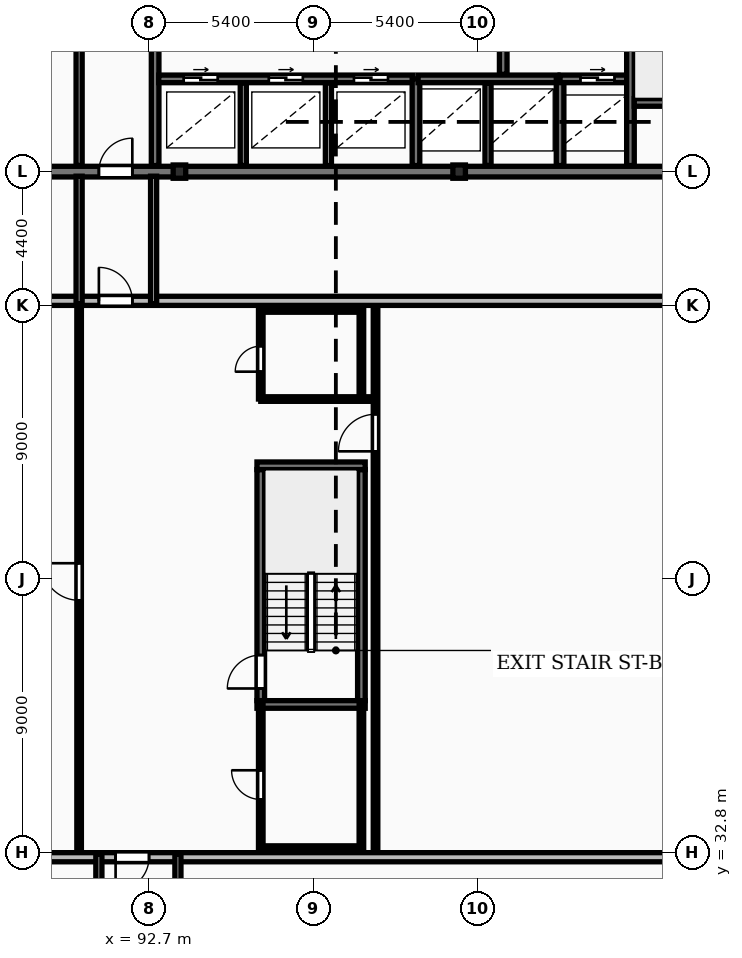
"""IFC4 building model, lengths in metres.
Left out: names, types, materials, properties, quantities, classifications, styles, units other than length and angle.
Written with IfcOpenShell. Run it as: python <this file> out.ifc"""

import sys

from ifc_helpers import new_model, si_unit, direction, frame, frame_2d, origin, origin_2d, place, context, subcontext, project, spatial, rectangle, i_section, extrude, element, fill, save


model = new_model("IFC4")
c1 = context("Model", 3, precision=1e-05, world=origin(), true_north=direction((0.0, 1.0)))
c2 = subcontext(c1, "Body", "Model", "MODEL_VIEW")
j1 = project(units=[si_unit("LENGTHUNIT", "METRE"), si_unit("PLANEANGLEUNIT", "RADIAN")], contexts=[c1])
p1 = place(None, origin())
s1 = spatial("IfcSite", under=j1, at=p1, CompositionType="ELEMENT")
p2 = place(p1, origin())
s2 = spatial("IfcBuilding", under=s1, at=p2, CompositionType="ELEMENT")
p3 = place(p2, frame((0.0, 0.0, 150.1)))
s3 = spatial("IfcBuildingStorey", under=s2, at=p3, CompositionType="ELEMENT", Elevation=150.1)
for number, where, z_axis, x_axis in (
    (1, (93.7, 55.2, 0.0), (0.0, 0.0, 1.0), (1.0, 0.0, 0.0)),
    (2, (102.9, 55.2, 0.0), (0.0, 0.0, 1.0), (1.0, 0.0, 0.0)),
):
    element("IfcColumn", number, at=place(p3, frame(where, z_axis=z_axis, x_axis=x_axis)), inside=s3, PredefinedType="COLUMN", context=c2, shape_type="SweptSolid", body=[
        extrude(i_section(OverallWidth=0.412, OverallDepth=0.437, WebThickness=0.036, FlangeThickness=0.052, FilletRadius=0.015, at=origin_2d()), origin(), (0.0, 0.0, 1.0), 3.6),
    ])
p4 = place(p3, frame((57.6, 50.95, 0.0), z_axis=(0.0, 0.0, 1.0), x_axis=(1.0, 0.0, 0.0)))
e3 = element("IfcWall", 3, at=p4, inside=s3, PredefinedType="STANDARD", context=c2, shape_type="SweptSolid", body=[
    extrude(rectangle(XDim=73.0, YDim=0.3, at=frame_2d((36.5, 0.0))), origin(), (0.0, 0.0, 1.0), 3.31),
])
p5 = place(p4, frame((15.225, 0.0, 0.85)))
e4 = element("IfcOpeningElement", 4, at=p5, cuts=e3, PredefinedType="OPENING", context=c2, shape_type="SweptSolid", body=[
    extrude(rectangle(XDim=1.8, YDim=1.8, at=frame_2d((0.9, 0.9))), frame((0.0, 0.16, 0.0), z_axis=(0.0, -1.0, 0.0), x_axis=(1.0, 0.0, 0.0)), (0.0, 0.0, 1.0), 0.32),
])
p6 = place(p4, frame((58.575, 0.0, 0.85)))
e5 = element("IfcOpeningElement", 5, at=p6, cuts=e3, PredefinedType="OPENING", context=c2, shape_type="SweptSolid", body=[
    extrude(rectangle(XDim=1.8, YDim=1.8, at=frame_2d((0.9, 0.9))), frame((0.0, 0.16, 0.0), z_axis=(0.0, -1.0, 0.0), x_axis=(1.0, 0.0, 0.0)), (0.0, 0.0, 1.0), 0.32),
])
p7 = place(p4, frame((33.45, 0.0, 0.0)))
e6 = element("IfcOpeningElement", 6, at=p7, cuts=e3, PredefinedType="OPENING", context=c2, shape_type="SweptSolid", body=[
    extrude(rectangle(XDim=1.1, YDim=2.1, at=frame_2d((0.55, 1.05))), frame((0.0, 0.16, 0.0), z_axis=(0.0, -1.0, 0.0), x_axis=(1.0, 0.0, 0.0)), (0.0, 0.0, 1.0), 0.32),
])
p8 = place(p3, frame((130.7, 32.65, 0.0), z_axis=(0.0, 0.0, 1.0), x_axis=(-1.0, 0.0, 0.0)))
e7 = element("IfcWall", 7, at=p8, inside=s3, PredefinedType="STANDARD", context=c2, shape_type="SweptSolid", body=[
    extrude(rectangle(XDim=58.0, YDim=0.3, at=frame_2d((29.0, 0.0))), origin(), (0.0, 0.0, 1.0), 3.31),
])
p9 = place(p8, frame((50.125, 0.0, 0.85)))
e8 = element("IfcOpeningElement", 8, at=p9, cuts=e7, PredefinedType="OPENING", context=c2, shape_type="SweptSolid", body=[
    extrude(rectangle(XDim=1.8, YDim=1.8, at=frame_2d((0.9, 0.9))), frame((0.0, 0.16, 0.0), z_axis=(0.0, -1.0, 0.0), x_axis=(1.0, 0.0, 0.0)), (0.0, 0.0, 1.0), 0.32),
])
p10 = place(p8, frame((6.775, 0.0, 0.85)))
e9 = element("IfcOpeningElement", 9, at=p10, cuts=e7, PredefinedType="OPENING", context=c2, shape_type="SweptSolid", body=[
    extrude(rectangle(XDim=1.8, YDim=1.8, at=frame_2d((0.9, 0.9))), frame((0.0, 0.16, 0.0), z_axis=(0.0, -1.0, 0.0), x_axis=(1.0, 0.0, 0.0)), (0.0, 0.0, 1.0), 0.32),
])
p11 = place(p8, frame((38.0, 0.0, 0.0)))
e10 = element("IfcOpeningElement", 10, at=p11, cuts=e7, PredefinedType="OPENING", context=c2, shape_type="SweptSolid", body=[
    extrude(rectangle(XDim=1.1, YDim=2.1, at=frame_2d((0.55, 1.05))), frame((0.0, 0.16, 0.0), z_axis=(0.0, -1.0, 0.0), x_axis=(1.0, 0.0, 0.0)), (0.0, 0.0, 1.0), 0.32),
])
p12 = place(p3, frame((75.95, 55.2, 0.0), z_axis=(0.0, 0.0, 1.0), x_axis=(1.0, 0.0, 0.0)))
e11 = element("IfcWall", 11, at=p12, inside=s3, PredefinedType="SHEAR", context=c2, shape_type="SweptSolid", body=[
    extrude(rectangle(XDim=36.3, YDim=0.35, at=frame_2d((18.15, 0.0))), origin(), (0.0, 0.0, 1.0), 3.6),
])
p13 = place(p12, frame((15.1, 0.0, 0.0)))
e12 = element("IfcOpeningElement", 12, at=p13, cuts=e11, PredefinedType="OPENING", context=c2, shape_type="SweptSolid", body=[
    extrude(rectangle(XDim=1.1, YDim=2.1, at=frame_2d((0.55, 1.05))), frame((0.0, 0.185, 0.0), z_axis=(0.0, -1.0, 0.0), x_axis=(1.0, 0.0, 0.0)), (0.0, 0.0, 1.0), 0.37),
])
p14 = place(p3, frame((90.4, 55.4, 0.0), z_axis=(0.0, 0.0, 1.0), x_axis=(0.0, 1.0, 0.0)))
e13 = element("IfcWall", 13, at=p14, inside=s3, PredefinedType="PARTITIONING", context=c2, shape_type="SweptSolid", body=[
    extrude(rectangle(XDim=4.1, YDim=0.2, at=frame_2d((2.05, 0.0))), origin(), (0.0, 0.0, 1.0), 3.31),
])
p15 = place(p3, frame((92.9, 55.4, 0.0), z_axis=(0.0, 0.0, 1.0), x_axis=(0.0, 1.0, 0.0)))
e14 = element("IfcWall", 14, at=p15, inside=s3, PredefinedType="SHEAR", context=c2, shape_type="SweptSolid", body=[
    extrude(rectangle(XDim=4.1, YDim=0.25, at=frame_2d((2.05, 0.0))), origin(), (0.0, 0.0, 1.0), 3.6),
])
for number, where, z_axis, x_axis in (
    (15, (95.8, 55.4, 0.0), (0.0, 0.0, 1.0), (0.0, 1.0, 0.0)),
    (16, (98.6, 55.4, 0.0), (0.0, 0.0, 1.0), (0.0, 1.0, 0.0)),
):
    element("IfcWall", number, at=place(p3, frame(where, z_axis=z_axis, x_axis=x_axis)), inside=s3, PredefinedType="PARTITIONING", context=c2, shape_type="SweptSolid", body=[
        extrude(rectangle(XDim=2.72, YDim=0.2, at=frame_2d((1.36, 0.0))), origin(), (0.0, 0.0, 1.0), 3.31),
    ])
p16 = place(p3, frame((93.02, 58.25, 0.0), z_axis=(0.0, 0.0, 1.0), x_axis=(1.0, 0.0, 0.0)))
e17 = element("IfcWall", 17, at=p16, inside=s3, PredefinedType="SHEAR", context=c2, shape_type="SweptSolid", body=[
    extrude(rectangle(XDim=8.36, YDim=0.25, at=frame_2d((4.18, 0.0))), origin(), (0.0, 0.0, 1.0), 3.6),
])
p17 = place(p16, frame((0.82, 0.0, 0.0)))
e18 = element("IfcOpeningElement", 18, at=p17, cuts=e17, PredefinedType="OPENING", context=c2, shape_type="SweptSolid", body=[
    extrude(rectangle(XDim=1.12, YDim=2.12, at=frame_2d((0.56, 1.06))), frame((0.0, 0.135, 0.0), z_axis=(0.0, -1.0, 0.0), x_axis=(1.0, 0.0, 0.0)), (0.0, 0.0, 1.0), 0.27),
])
p18 = place(p16, frame((3.62, 0.0, 0.0)))
e19 = element("IfcOpeningElement", 19, at=p18, cuts=e17, PredefinedType="OPENING", context=c2, shape_type="SweptSolid", body=[
    extrude(rectangle(XDim=1.12, YDim=2.12, at=frame_2d((0.56, 1.06))), frame((0.0, 0.135, 0.0), z_axis=(0.0, -1.0, 0.0), x_axis=(1.0, 0.0, 0.0)), (0.0, 0.0, 1.0), 0.27),
])
p19 = place(p16, frame((6.42, 0.0, 0.0)))
e20 = element("IfcOpeningElement", 20, at=p19, cuts=e17, PredefinedType="OPENING", context=c2, shape_type="SweptSolid", body=[
    extrude(rectangle(XDim=1.12, YDim=2.12, at=frame_2d((0.56, 1.06))), frame((0.0, 0.135, 0.0), z_axis=(0.0, -1.0, 0.0), x_axis=(1.0, 0.0, 0.0)), (0.0, 0.0, 1.0), 0.27),
])
p20 = place(p3, frame((101.48, 55.4, 0.0), z_axis=(0.0, 0.0, 1.0), x_axis=(0.0, 1.0, 0.0)))
e21 = element("IfcWall", 21, at=p20, inside=s3, PredefinedType="SHEAR", context=c2, shape_type="SweptSolid", body=[
    extrude(rectangle(XDim=2.85, YDim=0.25, at=frame_2d((1.425, 0.0))), origin(), (0.0, 0.0, 1.0), 3.6),
])
p21 = place(p3, frame((103.85, 55.4, 0.0), z_axis=(0.0, 0.0, 1.0), x_axis=(0.0, 1.0, 0.0)))
e22 = element("IfcWall", 22, at=p21, inside=s3, PredefinedType="PARTITIONING", context=c2, shape_type="SweptSolid", body=[
    extrude(rectangle(XDim=2.72, YDim=0.2, at=frame_2d((1.36, 0.0))), origin(), (0.0, 0.0, 1.0), 3.31),
])
p22 = place(p3, frame((101.55, 58.25, 0.0), z_axis=(0.0, 0.0, 1.0), x_axis=(1.0, 0.0, 0.0)))
e23 = element("IfcWall", 23, at=p22, inside=s3, PredefinedType="SHEAR", context=c2, shape_type="SweptSolid", body=[
    extrude(rectangle(XDim=4.6, YDim=0.25, at=frame_2d((2.3, 0.0))), origin(), (0.0, 0.0, 1.0), 3.6),
])
p23 = place(p3, frame((106.22, 55.4, 0.0), z_axis=(0.0, 0.0, 1.0), x_axis=(0.0, 1.0, 0.0)))
e24 = element("IfcWall", 24, at=p23, inside=s3, PredefinedType="SHEAR", context=c2, shape_type="SweptSolid", body=[
    extrude(rectangle(XDim=2.85, YDim=0.25, at=frame_2d((1.425, 0.0))), origin(), (0.0, 0.0, 1.0), 3.6),
])
p24 = place(p3, frame((106.22, 58.25, 0.0), z_axis=(0.0, 0.0, 1.0), x_axis=(1.0, 0.0, 0.0)))
e25 = element("IfcWall", 25, at=p24, inside=s3, PredefinedType="SHEAR", context=c2, shape_type="SweptSolid", body=[
    extrude(rectangle(XDim=2.46, YDim=0.25, at=frame_2d((1.23, 0.0))), origin(), (0.0, 0.0, 1.0), 3.6),
])
p25 = place(p24, frame((0.67, 0.0, 0.0)))
e26 = element("IfcOpeningElement", 26, at=p25, cuts=e25, PredefinedType="OPENING", context=c2, shape_type="SweptSolid", body=[
    extrude(rectangle(XDim=1.12, YDim=2.12, at=frame_2d((0.56, 1.06))), frame((0.0, 0.135, 0.0), z_axis=(0.0, -1.0, 0.0), x_axis=(1.0, 0.0, 0.0)), (0.0, 0.0, 1.0), 0.27),
])
p26 = place(p3, frame((104.35, 58.4, 0.0), z_axis=(0.0, 0.0, 1.0), x_axis=(0.0, 1.0, 0.0)))
e27 = element("IfcWall", 27, at=p26, inside=s3, PredefinedType="SHEAR", context=c2, shape_type="SweptSolid", body=[
    extrude(rectangle(XDim=8.6, YDim=0.25, at=frame_2d((4.3, 0.0))), origin(), (0.0, 0.0, 1.0), 3.6),
])
p27 = place(p26, frame((1.8, 0.0, 0.0)))
e28 = element("IfcOpeningElement", 28, at=p27, cuts=e27, PredefinedType="OPENING", context=c2, shape_type="SweptSolid", body=[
    extrude(rectangle(XDim=1.1, YDim=2.1, at=frame_2d((0.55, 1.05))), frame((0.0, 0.135, 0.0), z_axis=(0.0, -1.0, 0.0), x_axis=(1.0, 0.0, 0.0)), (0.0, 0.0, 1.0), 0.27),
])
p28 = place(p3, frame((108.535, 55.4, 0.0), z_axis=(0.0, 0.0, 1.0), x_axis=(0.0, 1.0, 0.0)))
e29 = element("IfcWall", 29, at=p28, inside=s3, PredefinedType="SHEAR", context=c2, shape_type="SweptSolid", body=[
    extrude(rectangle(XDim=11.6, YDim=0.25, at=frame_2d((5.8, 0.0))), origin(), (0.0, 0.0, 1.0), 3.6),
])
p29 = place(p28, frame((8.2, 0.0, 0.0)))
e30 = element("IfcOpeningElement", 30, at=p29, cuts=e29, PredefinedType="OPENING", context=c2, shape_type="SweptSolid", body=[
    extrude(rectangle(XDim=1.1, YDim=2.1, at=frame_2d((0.55, 1.05))), frame((0.0, 0.135, 0.0), z_axis=(0.0, -1.0, 0.0), x_axis=(1.0, 0.0, 0.0)), (0.0, 0.0, 1.0), 0.27),
])
p30 = place(p28, frame((10.25, 0.0, 0.0)))
e31 = element("IfcOpeningElement", 31, at=p30, cuts=e29, PredefinedType="OPENING", context=c2, shape_type="SweptSolid", body=[
    extrude(rectangle(XDim=0.85, YDim=2.05, at=frame_2d((0.425, 1.025))), frame((0.0, 0.135, 0.0), z_axis=(0.0, -1.0, 0.0), x_axis=(1.0, 0.0, 0.0)), (0.0, 0.0, 1.0), 0.27),
])
p31 = place(p3, frame((108.66, 57.475, 0.0), z_axis=(0.0, 0.0, 1.0), x_axis=(1.0, 0.0, 0.0)))
e32 = element("IfcWall", 32, at=p31, inside=s3, PredefinedType="SHEAR", context=c2, shape_type="SweptSolid", body=[
    extrude(rectangle(XDim=3.24, YDim=0.25, at=frame_2d((1.62, 0.0))), origin(), (0.0, 0.0, 1.0), 3.6),
])
for number, where, z_axis, x_axis in (
    (33, (90.4, 50.85, 0.0), (0.0, 0.0, 1.0), (0.0, 1.0, 0.0)),
    (34, (92.85, 50.85, 0.0), (0.0, 0.0, 1.0), (0.0, 1.0, 0.0)),
):
    element("IfcWall", number, at=place(p3, frame(where, z_axis=z_axis, x_axis=x_axis)), inside=s3, PredefinedType="PARTITIONING", context=c2, shape_type="SweptSolid", body=[
        extrude(rectangle(XDim=4.2, YDim=0.2, at=frame_2d((2.1, 0.0))), origin(), (0.0, 0.0, 1.0), 3.31),
    ])
p32 = place(p3, frame((91.05, 30.55, 0.0), z_axis=(0.0, 0.0, 1.0), x_axis=(0.0, 1.0, 0.0)))
e35 = element("IfcWall", 35, at=p32, inside=s3, PredefinedType="PARTITIONING", context=c2, shape_type="SweptSolid", body=[
    extrude(rectangle(XDim=2.2, YDim=0.2, at=frame_2d((1.1, 0.0))), origin(), (0.0, 0.0, 1.0), 3.31),
])
p33 = place(p3, frame((93.65, 30.55, 0.0), z_axis=(0.0, 0.0, 1.0), x_axis=(0.0, 1.0, 0.0)))
e36 = element("IfcWall", 36, at=p33, inside=s3, PredefinedType="PARTITIONING", context=c2, shape_type="SweptSolid", body=[
    extrude(rectangle(XDim=2.2, YDim=0.2, at=frame_2d((1.1, 0.0))), origin(), (0.0, 0.0, 1.0), 2.389),
])
p34 = place(p3, frame((96.375, 37.8, 0.0), z_axis=(0.0, 0.0, 1.0), x_axis=(0.0, 1.0, 0.0)))
e37 = element("IfcWall", 37, at=p34, inside=s3, PredefinedType="SHEAR", context=c2, shape_type="SweptSolid", body=[
    extrude(rectangle(XDim=7.6, YDim=0.25, at=frame_2d((3.8, 0.0))), origin(), (0.0, 0.0, 1.0), 3.6),
])
p35 = place(p34, frame((0.4, 0.0, 0.0)))
e38 = element("IfcOpeningElement", 38, at=p35, cuts=e37, PredefinedType="OPENING", context=c2, shape_type="SweptSolid", body=[
    extrude(rectangle(XDim=1.1, YDim=2.1, at=frame_2d((0.55, 1.05))), frame((0.0, 0.135, 0.0), z_axis=(0.0, -1.0, 0.0), x_axis=(1.0, 0.0, 0.0)), (0.0, 0.0, 1.0), 0.27),
])
p36 = place(p3, frame((99.685, 37.8, 0.0), z_axis=(0.0, 0.0, 1.0), x_axis=(0.0, 1.0, 0.0)))
e39 = element("IfcWall", 39, at=p36, inside=s3, PredefinedType="SHEAR", context=c2, shape_type="SweptSolid", body=[
    extrude(rectangle(XDim=7.6, YDim=0.25, at=frame_2d((3.8, 0.0))), origin(), (0.0, 0.0, 1.0), 3.6),
])
for number, where, z_axis, x_axis in (
    (40, (96.25, 37.675, 0.0), (0.0, 0.0, 1.0), (1.0, 0.0, 0.0)),
    (41, (96.25, 45.525, 0.0), (0.0, 0.0, 1.0), (1.0, 0.0, 0.0)),
):
    element("IfcWall", number, at=place(p3, frame(where, z_axis=z_axis, x_axis=x_axis)), inside=s3, PredefinedType="SHEAR", context=c2, shape_type="SweptSolid", body=[
        extrude(rectangle(XDim=3.56, YDim=0.25, at=frame_2d((1.78, 0.0))), origin(), (0.0, 0.0, 1.0), 3.6),
    ])
for number, where, z_axis, x_axis in (
    (42, (96.375, 32.95, 0.0), (0.0, 0.0, 1.0), (1.0, 0.0, 0.0)),
    (43, (96.375, 50.65, 0.0), (0.0, 0.0, 1.0), (1.0, 0.0, 0.0)),
):
    element("IfcWall", number, at=place(p3, frame(where, z_axis=z_axis, x_axis=x_axis)), inside=s3, PredefinedType="PARTITIONING", context=c2, shape_type="SweptSolid", body=[
        extrude(rectangle(XDim=3.31, YDim=0.15, at=frame_2d((1.655, 0.0))), origin(), (0.0, 0.0, 1.0), 2.69),
    ])
p37 = place(p3, frame((96.375, 32.95, 0.0), z_axis=(0.0, 0.0, 1.0), x_axis=(0.0, 1.0, 0.0)))
e44 = element("IfcWall", 44, at=p37, inside=s3, PredefinedType="PARTITIONING", context=c2, shape_type="SweptSolid", body=[
    extrude(rectangle(XDim=4.725, YDim=0.15, at=frame_2d((2.363, 0.0))), origin(), (0.0, 0.0, 1.0), 2.389),
])
p38 = place(p37, frame((1.6, 0.0, 0.0)))
e45 = element("IfcOpeningElement", 45, at=p38, cuts=e44, PredefinedType="OPENING", context=c2, shape_type="SweptSolid", body=[
    extrude(rectangle(XDim=0.96, YDim=2.1, at=frame_2d((0.48, 1.05))), frame((0.0, 0.085, 0.0), z_axis=(0.0, -1.0, 0.0), x_axis=(1.0, 0.0, 0.0)), (0.0, 0.0, 1.0), 0.17),
])
p39 = place(p3, frame((96.375, 47.72, 0.0), z_axis=(0.0, 0.0, 1.0), x_axis=(0.0, 1.0, 0.0)))
e46 = element("IfcWall", 46, at=p39, inside=s3, PredefinedType="PARTITIONING", context=c2, shape_type="SweptSolid", body=[
    extrude(rectangle(XDim=2.93, YDim=0.15, at=frame_2d((1.465, 0.0))), origin(), (0.0, 0.0, 1.0), 2.389),
])
p40 = place(p39, frame((0.9, 0.0, 0.0)))
e47 = element("IfcOpeningElement", 47, at=p40, cuts=e46, PredefinedType="OPENING", context=c2, shape_type="SweptSolid", body=[
    extrude(rectangle(XDim=0.84, YDim=2.04, at=frame_2d((0.42, 1.02))), frame((0.0, 0.085, 0.0), z_axis=(0.0, -1.0, 0.0), x_axis=(1.0, 0.0, 0.0)), (0.0, 0.0, 1.0), 0.17),
])
p41 = place(p3, frame((96.375, 47.72, 0.0), z_axis=(0.0, 0.0, 1.0), x_axis=(1.0, 0.0, 0.0)))
e48 = element("IfcWall", 48, at=p41, inside=s3, PredefinedType="PARTITIONING", context=c2, shape_type="SweptSolid", body=[
    extrude(rectangle(XDim=3.775, YDim=0.15, at=frame_2d((1.887, 0.0))), origin(), (0.0, 0.0, 1.0), 3.31),
])
p42 = place(p3, frame((99.685, 32.95, 0.0), z_axis=(0.0, 0.0, 1.0), x_axis=(0.0, 1.0, 0.0)))
e49 = element("IfcWall", 49, at=p42, inside=s3, PredefinedType="PARTITIONING", context=c2, shape_type="SweptSolid", body=[
    extrude(rectangle(XDim=4.725, YDim=0.15, at=frame_2d((2.363, 0.0))), origin(), (0.0, 0.0, 1.0), 2.389),
])
p43 = place(p3, frame((99.685, 47.72, 0.0), z_axis=(0.0, 0.0, 1.0), x_axis=(0.0, 1.0, 0.0)))
e50 = element("IfcWall", 50, at=p43, inside=s3, PredefinedType="PARTITIONING", context=c2, shape_type="SweptSolid", body=[
    extrude(rectangle(XDim=2.93, YDim=0.15, at=frame_2d((1.465, 0.0))), origin(), (0.0, 0.0, 1.0), 2.389),
])
p44 = place(p3, frame((90.4, 32.9, 0.0), z_axis=(0.0, 0.0, 1.0), x_axis=(0.0, 1.0, 0.0)))
e51 = element("IfcWall", 51, at=p44, inside=s3, PredefinedType="PARTITIONING", context=c2, shape_type="SweptSolid", body=[
    extrude(rectangle(XDim=17.8, YDim=0.15, at=frame_2d((8.9, 0.0))), origin(), (0.0, 0.0, 1.0), 3.31),
])
p45 = place(p44, frame((8.2, 0.0, 0.0)))
e52 = element("IfcOpeningElement", 52, at=p45, cuts=e51, PredefinedType="OPENING", context=c2, shape_type="SweptSolid", body=[
    extrude(rectangle(XDim=1.22, YDim=2.18, at=frame_2d((0.61, 1.09))), frame((0.0, 0.085, 0.0), z_axis=(0.0, -1.0, 0.0), x_axis=(1.0, 0.0, 0.0)), (0.0, 0.0, 1.0), 0.17),
])
p46 = place(p3, frame((100.15, 32.9, 0.0), z_axis=(0.0, 0.0, 1.0), x_axis=(0.0, 1.0, 0.0)))
e53 = element("IfcWall", 53, at=p46, inside=s3, PredefinedType="PARTITIONING", context=c2, shape_type="SweptSolid", body=[
    extrude(rectangle(XDim=17.8, YDim=0.15, at=frame_2d((8.9, 0.0))), origin(), (0.0, 0.0, 1.0), 3.31),
])
p47 = place(p46, frame((13.1, 0.0, 0.0)))
e54 = element("IfcOpeningElement", 54, at=p47, cuts=e53, PredefinedType="OPENING", context=c2, shape_type="SweptSolid", body=[
    extrude(rectangle(XDim=1.22, YDim=2.18, at=frame_2d((0.61, 1.09))), frame((0.0, 0.085, 0.0), z_axis=(0.0, -1.0, 0.0), x_axis=(1.0, 0.0, 0.0)), (0.0, 0.0, 1.0), 0.17),
])
p48 = place(p7, origin())
e55 = element("IfcDoor", 55, at=p48, inside=s3, OperationType="SINGLE_SWING_LEFT", PredefinedType="DOOR", context=c2, shape_type="SweptSolid", body=[
    extrude(rectangle(XDim=1.1, YDim=2.1, at=frame_2d((0.55, 1.05))), frame((0.0, 0.025, 0.0), z_axis=(0.0, -1.0, 0.0), x_axis=(1.0, 0.0, 0.0)), (0.0, 0.0, 1.0), 0.05),
])
fill(e6, e55)
p49 = place(p11, origin())
e56 = element("IfcDoor", 56, at=p49, inside=s3, OperationType="SINGLE_SWING_RIGHT", PredefinedType="DOOR", context=c2, shape_type="SweptSolid", body=[
    extrude(rectangle(XDim=1.1, YDim=2.1, at=frame_2d((0.55, 1.05))), frame((0.0, 0.025, 0.0), z_axis=(0.0, -1.0, 0.0), x_axis=(1.0, 0.0, 0.0)), (0.0, 0.0, 1.0), 0.05),
])
fill(e10, e56)
p50 = place(p13, origin())
e57 = element("IfcDoor", 57, at=p50, inside=s3, OperationType="SINGLE_SWING_RIGHT", PredefinedType="DOOR", context=c2, shape_type="SweptSolid", body=[
    extrude(rectangle(XDim=1.1, YDim=2.1, at=frame_2d((0.55, 1.05))), frame((0.0, 0.025, 0.0), z_axis=(0.0, -1.0, 0.0), x_axis=(1.0, 0.0, 0.0)), (0.0, 0.0, 1.0), 0.05),
])
fill(e12, e57)
p51 = place(p17, origin())
e58 = element("IfcDoor", 58, at=p51, inside=s3, OperationType="SLIDING_TO_RIGHT", PredefinedType="DOOR", context=c2, shape_type="SweptSolid", body=[
    extrude(rectangle(XDim=1.12, YDim=2.12, at=frame_2d((0.56, 1.06))), frame((0.0, 0.025, 0.0), z_axis=(0.0, -1.0, 0.0), x_axis=(1.0, 0.0, 0.0)), (0.0, 0.0, 1.0), 0.05),
])
fill(e18, e58)
p52 = place(p18, origin())
e59 = element("IfcDoor", 59, at=p52, inside=s3, OperationType="SLIDING_TO_RIGHT", PredefinedType="DOOR", context=c2, shape_type="SweptSolid", body=[
    extrude(rectangle(XDim=1.12, YDim=2.12, at=frame_2d((0.56, 1.06))), frame((0.0, 0.025, 0.0), z_axis=(0.0, -1.0, 0.0), x_axis=(1.0, 0.0, 0.0)), (0.0, 0.0, 1.0), 0.05),
])
fill(e19, e59)
p53 = place(p19, origin())
e60 = element("IfcDoor", 60, at=p53, inside=s3, OperationType="SLIDING_TO_RIGHT", PredefinedType="DOOR", context=c2, shape_type="SweptSolid", body=[
    extrude(rectangle(XDim=1.12, YDim=2.12, at=frame_2d((0.56, 1.06))), frame((0.0, 0.025, 0.0), z_axis=(0.0, -1.0, 0.0), x_axis=(1.0, 0.0, 0.0)), (0.0, 0.0, 1.0), 0.05),
])
fill(e20, e60)
p54 = place(p25, origin())
e61 = element("IfcDoor", 61, at=p54, inside=s3, OperationType="SLIDING_TO_RIGHT", PredefinedType="DOOR", context=c2, shape_type="SweptSolid", body=[
    extrude(rectangle(XDim=1.12, YDim=2.12, at=frame_2d((0.56, 1.06))), frame((0.0, 0.025, 0.0), z_axis=(0.0, -1.0, 0.0), x_axis=(1.0, 0.0, 0.0)), (0.0, 0.0, 1.0), 0.05),
])
fill(e26, e61)
p55 = place(p35, origin())
e62 = element("IfcDoor", 62, at=p55, inside=s3, OperationType="SINGLE_SWING_LEFT", PredefinedType="DOOR", context=c2, shape_type="SweptSolid", body=[
    extrude(rectangle(XDim=1.1, YDim=2.1, at=frame_2d((0.55, 1.05))), frame((0.0, 0.025, 0.0), z_axis=(0.0, -1.0, 0.0), x_axis=(1.0, 0.0, 0.0)), (0.0, 0.0, 1.0), 0.05),
])
fill(e38, e62)
p56 = place(p38, origin())
e63 = element("IfcDoor", 63, at=p56, inside=s3, OperationType="SINGLE_SWING_RIGHT", PredefinedType="DOOR", context=c2, shape_type="SweptSolid", body=[
    extrude(rectangle(XDim=0.96, YDim=2.1, at=frame_2d((0.48, 1.05))), frame((0.0, 0.025, 0.0), z_axis=(0.0, -1.0, 0.0), x_axis=(1.0, 0.0, 0.0)), (0.0, 0.0, 1.0), 0.05),
])
fill(e45, e63)
p57 = place(p40, origin())
e64 = element("IfcDoor", 64, at=p57, inside=s3, OperationType="SINGLE_SWING_LEFT", PredefinedType="DOOR", context=c2, shape_type="SweptSolid", body=[
    extrude(rectangle(XDim=0.84, YDim=2.04, at=frame_2d((0.42, 1.02))), frame((0.0, 0.025, 0.0), z_axis=(0.0, -1.0, 0.0), x_axis=(1.0, 0.0, 0.0)), (0.0, 0.0, 1.0), 0.05),
])
fill(e47, e64)
p58 = place(p45, origin())
e65 = element("IfcDoor", 65, at=p58, inside=s3, OperationType="SINGLE_SWING_RIGHT", PredefinedType="DOOR", context=c2, shape_type="SweptSolid", body=[
    extrude(rectangle(XDim=1.22, YDim=2.18, at=frame_2d((0.61, 1.09))), frame((0.0, 0.025, 0.0), z_axis=(0.0, -1.0, 0.0), x_axis=(1.0, 0.0, 0.0)), (0.0, 0.0, 1.0), 0.05),
])
fill(e52, e65)
p59 = place(p47, origin())
e66 = element("IfcDoor", 66, at=p59, inside=s3, OperationType="SINGLE_SWING_LEFT", PredefinedType="DOOR", context=c2, shape_type="SweptSolid", body=[
    extrude(rectangle(XDim=1.22, YDim=2.18, at=frame_2d((0.61, 1.09))), frame((0.0, 0.025, 0.0), z_axis=(0.0, -1.0, 0.0), x_axis=(1.0, 0.0, 0.0)), (0.0, 0.0, 1.0), 0.05),
])
fill(e54, e66)
save(model, sys.argv[1])
